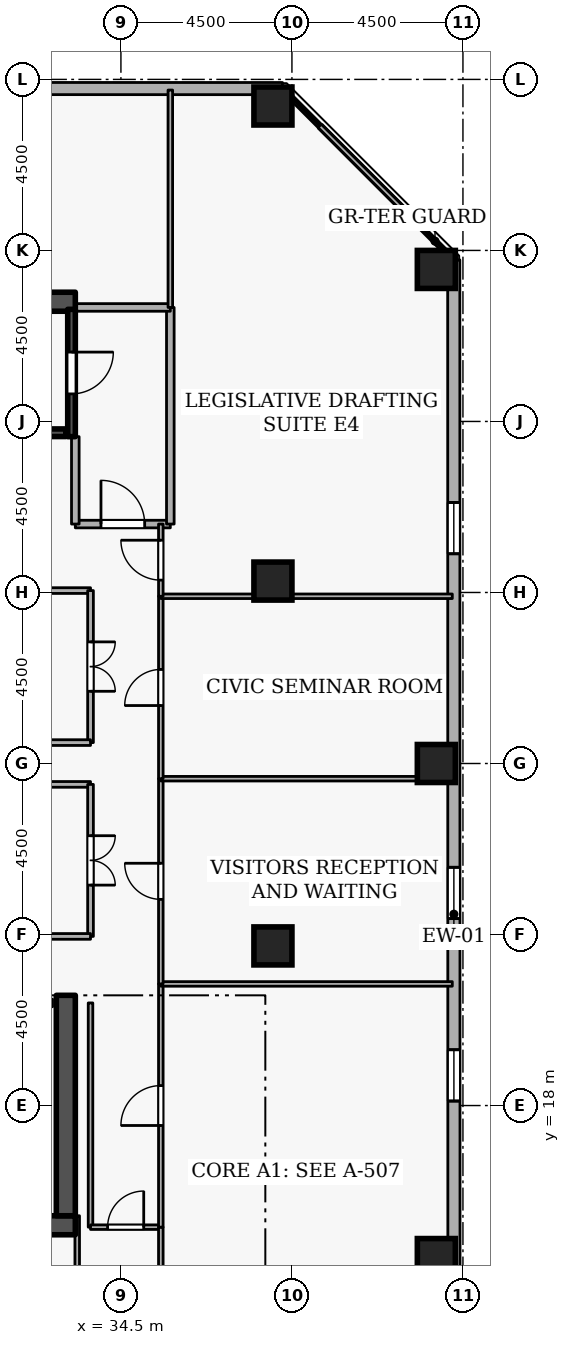
"""IFC4 building model, lengths in metres.
Left out: names, types, materials, properties, quantities, classifications, styles, units other than length and angle.
Written with IfcOpenShell. Run it as: python <this file> out.ifc"""

import sys

from ifc_helpers import new_model, si_unit, direction, frame, frame_2d, origin, origin_2d, place, context, subcontext, project, spatial, rectangle, extrude, element, fill, save


model = new_model("IFC4")
c1 = context("Model", 3, precision=1e-05, world=origin(), true_north=direction((0.0, 1.0)))
c2 = subcontext(c1, "Body", "Model", "MODEL_VIEW")
j1 = project(units=[si_unit("LENGTHUNIT", "METRE"), si_unit("PLANEANGLEUNIT", "RADIAN")], contexts=[c1])
p1 = place(None, origin())
s1 = spatial("IfcSite", under=j1, at=p1, CompositionType="ELEMENT")
p2 = place(p1, origin())
s2 = spatial("IfcBuilding", under=s1, at=p2, CompositionType="ELEMENT")
p3 = place(p2, frame((0.0, 0.0, 251.1)))
s3 = spatial("IfcBuildingStorey", under=s2, at=p3, CompositionType="ELEMENT", Elevation=251.1)
p4 = place(p3, frame((17.7, 14.85, 0.0), z_axis=(0.0, 0.0, 1.0), x_axis=(1.0, 0.0, 0.0)))
e1 = element("IfcWall", 1, at=p4, inside=s3, PredefinedType="SHEAR", context=c2, shape_type="SweptSolid", body=[
    extrude(rectangle(XDim=15.6, YDim=0.5, at=frame_2d((7.8, 0.0))), origin(), (0.0, 0.0, 1.0), 3.6),
])
p5 = place(p3, frame((33.05, 15.1, 0.0), z_axis=(0.0, 0.0, 1.0), x_axis=(0.0, 1.0, 0.0)))
e2 = element("IfcWall", 2, at=p5, inside=s3, PredefinedType="SHEAR", context=c2, shape_type="SweptSolid", body=[
    extrude(rectangle(XDim=5.8, YDim=0.5, at=frame_2d((2.9, 0.0))), origin(), (0.0, 0.0, 1.0), 3.6),
])
p6 = place(p3, frame((17.7, 39.15, 0.0), z_axis=(0.0, 0.0, 1.0), x_axis=(1.0, 0.0, 0.0)))
e3 = element("IfcWall", 3, at=p6, inside=s3, PredefinedType="SHEAR", context=c2, shape_type="SweptSolid", body=[
    extrude(rectangle(XDim=15.6, YDim=0.5, at=frame_2d((7.8, 0.0))), origin(), (0.0, 0.0, 1.0), 3.6),
])
for number, where, z_axis, x_axis in (
    (4, (42.8, 14.0, 0.0), (0.0, 0.0, 1.0), (1.0, 0.0, 0.0)),
    (5, (42.8, 27.0, 0.0), (0.0, 0.0, 1.0), (1.0, 0.0, 0.0)),
    (6, (42.8, 40.0, 0.0), (0.0, 0.0, 1.0), (1.0, 0.0, 0.0)),
    (7, (38.5, 44.3, 0.0), (0.0, 0.0, 1.0), (1.0, 0.0, 0.0)),
    (8, (38.5, 22.2, 0.0), (0.0, 0.0, 1.0), (1.0, 0.0, 0.0)),
    (9, (38.5, 31.8, 0.0), (0.0, 0.0, 1.0), (1.0, 0.0, 0.0)),
):
    element("IfcColumn", number, at=place(p3, frame(where, z_axis=z_axis, x_axis=x_axis)), inside=s3, PredefinedType="COLUMN", context=c2, shape_type="SweptSolid", body=[
        extrude(rectangle(XDim=1.0, YDim=1.0, at=origin_2d()), origin(), (0.0, 0.0, 1.0), 3.6),
    ])
p7 = place(p3, frame((43.265, 5.819, 0.0), z_axis=(0.0, 0.0, 1.0), x_axis=(-0.000184351399, 0.999999983007, 0.0)))
e10 = element("IfcWall", 10, at=p7, inside=s3, PredefinedType="STANDARD", context=c2, shape_type="SweptSolid", body=[
    extrude(rectangle(XDim=34.432, YDim=0.32, at=frame_2d((17.216, 0.0))), origin(), (0.0, 0.0, 1.0), 2.22),
])
p8 = place(p7, frame((2.7, 0.0, 0.72)))
e11 = element("IfcOpeningElement", 11, at=p8, cuts=e10, PredefinedType="OPENING", context=c2, shape_type="SweptSolid", body=[
    extrude(rectangle(XDim=1.35, YDim=1.05, at=frame_2d((0.675, 0.525))), frame((0.0, 0.17, 0.0), z_axis=(0.0, -1.0, 0.0), x_axis=(1.0, 0.0, 0.0)), (0.0, 0.0, 1.0), 0.34),
])
p9 = place(p7, frame((12.3, 0.0, 0.72)))
e12 = element("IfcOpeningElement", 12, at=p9, cuts=e10, PredefinedType="OPENING", context=c2, shape_type="SweptSolid", body=[
    extrude(rectangle(XDim=1.35, YDim=1.05, at=frame_2d((0.675, 0.525))), frame((0.0, 0.17, 0.0), z_axis=(0.0, -1.0, 0.0), x_axis=(1.0, 0.0, 0.0)), (0.0, 0.0, 1.0), 0.34),
])
p10 = place(p7, frame((17.1, 0.0, 0.72)))
e13 = element("IfcOpeningElement", 13, at=p10, cuts=e10, PredefinedType="OPENING", context=c2, shape_type="SweptSolid", body=[
    extrude(rectangle(XDim=1.35, YDim=1.05, at=frame_2d((0.675, 0.525))), frame((0.0, 0.17, 0.0), z_axis=(0.0, -1.0, 0.0), x_axis=(1.0, 0.0, 0.0)), (0.0, 0.0, 1.0), 0.34),
])
p11 = place(p7, frame((26.7, 0.0, 0.72)))
e14 = element("IfcOpeningElement", 14, at=p11, cuts=e10, PredefinedType="OPENING", context=c2, shape_type="SweptSolid", body=[
    extrude(rectangle(XDim=1.35, YDim=1.05, at=frame_2d((0.675, 0.525))), frame((0.0, 0.17, 0.0), z_axis=(0.0, -1.0, 0.0), x_axis=(1.0, 0.0, 0.0)), (0.0, 0.0, 1.0), 0.34),
])
p12 = place(p3, frame((38.751, 44.758, 0.0), z_axis=(0.0, 0.0, 1.0), x_axis=(-0.999999983007, 0.000184351399, 0.0)))
e15 = element("IfcWall", 15, at=p12, inside=s3, PredefinedType="STANDARD", context=c2, shape_type="SweptSolid", body=[
    extrude(rectangle(XDim=34.432, YDim=0.32, at=frame_2d((17.216, 0.0))), origin(), (0.0, 0.0, 1.0), 2.22),
])
p13 = place(p12, frame((7.5, 0.0, 0.72)))
e16 = element("IfcOpeningElement", 16, at=p13, cuts=e15, PredefinedType="OPENING", context=c2, shape_type="SweptSolid", body=[
    extrude(rectangle(XDim=1.35, YDim=1.05, at=frame_2d((0.675, 0.525))), frame((0.0, 0.17, 0.0), z_axis=(0.0, -1.0, 0.0), x_axis=(1.0, 0.0, 0.0)), (0.0, 0.0, 1.0), 0.34),
])
p14 = place(p12, frame((17.1, 0.0, 0.72)))
e17 = element("IfcOpeningElement", 17, at=p14, cuts=e15, PredefinedType="OPENING", context=c2, shape_type="SweptSolid", body=[
    extrude(rectangle(XDim=1.35, YDim=1.05, at=frame_2d((0.675, 0.525))), frame((0.0, 0.17, 0.0), z_axis=(0.0, -1.0, 0.0), x_axis=(1.0, 0.0, 0.0)), (0.0, 0.0, 1.0), 0.34),
])
p15 = place(p3, frame((33.2, 38.95, 0.0), z_axis=(0.0, 0.0, 1.0), x_axis=(0.0, -1.0, 0.0)))
e18 = element("IfcWall", 18, at=p15, inside=s3, PredefinedType="SHEAR", context=c2, shape_type="SweptSolid", body=[
    extrude(rectangle(XDim=3.35, YDim=0.2, at=frame_2d((1.675, 0.0))), origin(), (0.0, 0.0, 1.0), 3.6),
])
p16 = place(p15, frame((1.125, 0.0, 0.0)))
e19 = element("IfcOpeningElement", 19, at=p16, cuts=e18, PredefinedType="OPENING", context=c2, shape_type="SweptSolid", body=[
    extrude(rectangle(XDim=1.1, YDim=2.1, at=frame_2d((0.55, 1.05))), frame((0.0, 0.11, 0.0), z_axis=(0.0, -1.0, 0.0), x_axis=(1.0, 0.0, 0.0)), (0.0, 0.0, 1.0), 0.22),
])
p17 = place(p3, frame((25.95, 35.703, 0.0), z_axis=(0.0, 0.0, 1.0), x_axis=(1.0, 0.0, 0.0)))
e20 = element("IfcWall", 20, at=p17, inside=s3, PredefinedType="SHEAR", context=c2, shape_type="SweptSolid", body=[
    extrude(rectangle(XDim=7.1, YDim=0.2, at=frame_2d((3.55, 0.0))), origin(), (0.0, 0.0, 1.0), 3.6),
])
p18 = place(p3, frame((33.3, 33.3, 0.0), z_axis=(0.0, 0.0, 1.0), x_axis=(1.0, 0.0, 0.0)))
e21 = element("IfcWall", 21, at=p18, inside=s3, PredefinedType="STANDARD", context=c2, shape_type="SweptSolid", body=[
    extrude(rectangle(XDim=2.5, YDim=0.2, at=frame_2d((1.25, 0.0))), origin(), (0.0, 0.0, 1.0), 3.32),
])
p19 = place(p18, frame((0.675, 0.0, 0.0)))
e22 = element("IfcOpeningElement", 22, at=p19, cuts=e21, PredefinedType="OPENING", context=c2, shape_type="SweptSolid", body=[
    extrude(rectangle(XDim=1.15, YDim=2.1, at=frame_2d((0.575, 1.05))), frame((0.0, 0.11, 0.0), z_axis=(0.0, -1.0, 0.0), x_axis=(1.0, 0.0, 0.0)), (0.0, 0.0, 1.0), 0.22),
])
p20 = place(p3, frame((35.8, 33.3, 0.0), z_axis=(0.0, 0.0, 1.0), x_axis=(0.0, 1.0, 0.0)))
e23 = element("IfcWall", 23, at=p20, inside=s3, PredefinedType="STANDARD", context=c2, shape_type="SweptSolid", body=[
    extrude(rectangle(XDim=5.7, YDim=0.2, at=frame_2d((2.85, 0.0))), origin(), (0.0, 0.0, 1.0), 3.32),
])
p21 = place(p3, frame((35.8, 39.0, 0.0), z_axis=(0.0, 0.0, 1.0), x_axis=(-1.0, 0.0, 0.0)))
e24 = element("IfcWall", 24, at=p21, inside=s3, PredefinedType="STANDARD", context=c2, shape_type="SweptSolid", body=[
    extrude(rectangle(XDim=2.5, YDim=0.2, at=frame_2d((1.25, 0.0))), origin(), (0.0, 0.0, 1.0), 3.32),
])
p22 = place(p3, frame((33.3, 35.6, 0.0), z_axis=(0.0, 0.0, 1.0), x_axis=(0.0, -1.0, 0.0)))
e25 = element("IfcWall", 25, at=p22, inside=s3, PredefinedType="STANDARD", context=c2, shape_type="SweptSolid", body=[
    extrude(rectangle(XDim=2.3, YDim=0.2, at=frame_2d((1.15, 0.0))), origin(), (0.0, 0.0, 1.0), 2.525),
])
p23 = place(p3, frame((33.7, 20.7, 0.0), z_axis=(0.0, 0.0, 1.0), x_axis=(0.0, -1.0, 0.0)))
e26 = element("IfcWall", 26, at=p23, inside=s3, PredefinedType="PARTITIONING", context=c2, shape_type="SweptSolid", body=[
    extrude(rectangle(XDim=5.9, YDim=0.12, at=frame_2d((2.95, 0.0))), origin(), (0.0, 0.0, 1.0), 3.32),
])
p24 = place(p3, frame((33.7, 14.8, 0.0), z_axis=(0.0, 0.0, 1.0), x_axis=(1.0, 0.0, 0.0)))
e27 = element("IfcWall", 27, at=p24, inside=s3, PredefinedType="PARTITIONING", context=c2, shape_type="SweptSolid", body=[
    extrude(rectangle(XDim=1.85, YDim=0.12, at=frame_2d((0.925, 0.0))), origin(), (0.0, 0.0, 1.0), 3.32),
])
p25 = place(p24, frame((0.45, 0.0, 0.0)))
e28 = element("IfcOpeningElement", 28, at=p25, cuts=e27, PredefinedType="OPENING", context=c2, shape_type="SweptSolid", body=[
    extrude(rectangle(XDim=0.95, YDim=2.1, at=frame_2d((0.475, 1.05))), frame((0.0, 0.07, 0.0), z_axis=(0.0, -1.0, 0.0), x_axis=(1.0, 0.0, 0.0)), (0.0, 0.0, 1.0), 0.14),
])
p26 = place(p3, frame((35.55, 14.8, 0.0), z_axis=(0.0, 0.0, 1.0), x_axis=(0.0, -1.0, 0.0)))
e29 = element("IfcWall", 29, at=p26, inside=s3, PredefinedType="PARTITIONING", context=c2, shape_type="SweptSolid", body=[
    extrude(rectangle(XDim=11.52, YDim=0.12, at=frame_2d((5.76, 0.0))), origin(), (0.0, 0.0, 1.0), 3.32),
])
p27 = place(p3, frame((33.35, 3.28, 0.0), z_axis=(0.0, 0.0, 1.0), x_axis=(0.0, 1.0, 0.0)))
e30 = element("IfcWall", 30, at=p27, inside=s3, PredefinedType="PARTITIONING", context=c2, shape_type="SweptSolid", body=[
    extrude(rectangle(XDim=11.82, YDim=0.12, at=frame_2d((5.91, 0.0))), origin(), (0.0, 0.0, 1.0), 2.525),
])
p28 = place(p3, frame((35.55, 14.8, 0.0), z_axis=(0.0, 0.0, 1.0), x_axis=(0.0, 1.0, 0.0)))
e31 = element("IfcWall", 31, at=p28, inside=s3, PredefinedType="PARTITIONING", context=c2, shape_type="SweptSolid", body=[
    extrude(rectangle(XDim=6.4, YDim=0.12, at=frame_2d((3.2, 0.0))), origin(), (0.0, 0.0, 1.0), 3.32),
])
p29 = place(p28, frame((2.675, 0.0, 0.0)))
e32 = element("IfcOpeningElement", 32, at=p29, cuts=e31, PredefinedType="OPENING", context=c2, shape_type="SweptSolid", body=[
    extrude(rectangle(XDim=1.05, YDim=2.1, at=frame_2d((0.525, 1.05))), frame((0.0, 0.07, 0.0), z_axis=(0.0, -1.0, 0.0), x_axis=(1.0, 0.0, 0.0)), (0.0, 0.0, 1.0), 0.14),
])
p30 = place(p3, frame((35.55, 21.2, 0.0), z_axis=(0.0, 0.0, 1.0), x_axis=(1.0, 0.0, 0.0)))
e33 = element("IfcWall", 33, at=p30, inside=s3, PredefinedType="PARTITIONING", context=c2, shape_type="SweptSolid", body=[
    extrude(rectangle(XDim=7.67, YDim=0.12, at=frame_2d((3.835, 0.0))), origin(), (0.0, 0.0, 1.0), 3.32),
])
p31 = place(p3, frame((35.55, 21.2, 0.0), z_axis=(0.0, 0.0, 1.0), x_axis=(0.0, 1.0, 0.0)))
e34 = element("IfcWall", 34, at=p31, inside=s3, PredefinedType="PARTITIONING", context=c2, shape_type="SweptSolid", body=[
    extrude(rectangle(XDim=5.4, YDim=0.12, at=frame_2d((2.7, 0.0))), origin(), (0.0, 0.0, 1.0), 3.32),
])
p32 = place(p31, frame((2.225, 0.0, 0.0)))
e35 = element("IfcOpeningElement", 35, at=p32, cuts=e34, PredefinedType="OPENING", context=c2, shape_type="SweptSolid", body=[
    extrude(rectangle(XDim=0.95, YDim=2.1, at=frame_2d((0.475, 1.05))), frame((0.0, 0.07, 0.0), z_axis=(0.0, -1.0, 0.0), x_axis=(1.0, 0.0, 0.0)), (0.0, 0.0, 1.0), 0.14),
])
p33 = place(p3, frame((35.55, 26.6, 0.0), z_axis=(0.0, 0.0, 1.0), x_axis=(1.0, 0.0, 0.0)))
e36 = element("IfcWall", 36, at=p33, inside=s3, PredefinedType="PARTITIONING", context=c2, shape_type="SweptSolid", body=[
    extrude(rectangle(XDim=7.67, YDim=0.12, at=frame_2d((3.835, 0.0))), origin(), (0.0, 0.0, 1.0), 1.785),
])
p34 = place(p3, frame((35.55, 26.6, 0.0), z_axis=(0.0, 0.0, 1.0), x_axis=(0.0, 1.0, 0.0)))
e37 = element("IfcWall", 37, at=p34, inside=s3, PredefinedType="PARTITIONING", context=c2, shape_type="SweptSolid", body=[
    extrude(rectangle(XDim=4.8, YDim=0.12, at=frame_2d((2.4, 0.0))), origin(), (0.0, 0.0, 1.0), 3.32),
])
p35 = place(p34, frame((1.925, 0.0, 0.0)))
e38 = element("IfcOpeningElement", 38, at=p35, cuts=e37, PredefinedType="OPENING", context=c2, shape_type="SweptSolid", body=[
    extrude(rectangle(XDim=0.95, YDim=2.1, at=frame_2d((0.475, 1.05))), frame((0.0, 0.07, 0.0), z_axis=(0.0, -1.0, 0.0), x_axis=(1.0, 0.0, 0.0)), (0.0, 0.0, 1.0), 0.14),
])
p36 = place(p3, frame((35.55, 31.4, 0.0), z_axis=(0.0, 0.0, 1.0), x_axis=(1.0, 0.0, 0.0)))
e39 = element("IfcWall", 39, at=p36, inside=s3, PredefinedType="PARTITIONING", context=c2, shape_type="SweptSolid", body=[
    extrude(rectangle(XDim=7.67, YDim=0.12, at=frame_2d((3.835, 0.0))), origin(), (0.0, 0.0, 1.0), 3.32),
])
p37 = place(p3, frame((35.8, 39.0, 0.0), z_axis=(0.0, 0.0, 1.0), x_axis=(0.0, 1.0, 0.0)))
e40 = element("IfcWall", 40, at=p37, inside=s3, PredefinedType="PARTITIONING", context=c2, shape_type="SweptSolid", body=[
    extrude(rectangle(XDim=5.72, YDim=0.12, at=frame_2d((2.86, 0.0))), origin(), (0.0, 0.0, 1.0), 3.32),
])
p38 = place(p3, frame((38.787, 44.72, 0.0), z_axis=(0.0, 0.0, 1.0), x_axis=(0.707106781187, -0.707106781187, 0.0)))
e41 = element("IfcWall", 41, at=p38, inside=s3, PredefinedType="PARTITIONING", context=c2, shape_type="SweptSolid", body=[
    extrude(rectangle(XDim=6.269, YDim=0.12, at=frame_2d((3.134, 0.0))), origin(), (0.0, 0.0, 1.0), 3.32),
])
p39 = place(p3, frame((35.55, 31.4, 0.0), z_axis=(0.0, 0.0, 1.0), x_axis=(0.0, 1.0, 0.0)))
e42 = element("IfcWall", 42, at=p39, inside=s3, PredefinedType="PARTITIONING", context=c2, shape_type="SweptSolid", body=[
    extrude(rectangle(XDim=1.9, YDim=0.12, at=frame_2d((0.95, 0.0))), origin(), (0.0, 0.0, 1.0), 3.32),
])
p40 = place(p39, frame((0.425, 0.0, 0.0)))
e43 = element("IfcOpeningElement", 43, at=p40, cuts=e42, PredefinedType="OPENING", context=c2, shape_type="SweptSolid", body=[
    extrude(rectangle(XDim=1.05, YDim=2.1, at=frame_2d((0.525, 1.05))), frame((0.0, 0.07, 0.0), z_axis=(0.0, -1.0, 0.0), x_axis=(1.0, 0.0, 0.0)), (0.0, 0.0, 1.0), 0.14),
])
p41 = place(p3, frame((30.7, 26.45, 0.0), z_axis=(0.0, 0.0, 1.0), x_axis=(1.0, 0.0, 0.0)))
e44 = element("IfcWall", 44, at=p41, inside=s3, PredefinedType="PARTITIONING", context=c2, shape_type="SweptSolid", body=[
    extrude(rectangle(XDim=3.0, YDim=0.15, at=frame_2d((1.5, 0.0))), origin(), (0.0, 0.0, 1.0), 1.785),
])
p42 = place(p3, frame((33.7, 26.45, 0.0), z_axis=(0.0, 0.0, 1.0), x_axis=(0.0, -1.0, 0.0)))
e45 = element("IfcWall", 45, at=p42, inside=s3, PredefinedType="PARTITIONING", context=c2, shape_type="SweptSolid", body=[
    extrude(rectangle(XDim=4.0, YDim=0.15, at=frame_2d((2.0, 0.0))), origin(), (0.0, 0.0, 1.0), 3.32),
])
p43 = place(p42, frame((1.35, 0.0, 0.0)))
e46 = element("IfcOpeningElement", 46, at=p43, cuts=e45, PredefinedType="OPENING", context=c2, shape_type="SweptSolid", body=[
    extrude(rectangle(XDim=1.3, YDim=2.12, at=frame_2d((0.65, 1.06))), frame((0.0, 0.085, 0.0), z_axis=(0.0, -1.0, 0.0), x_axis=(1.0, 0.0, 0.0)), (0.0, 0.0, 1.0), 0.17),
])
for number, where, z_axis, x_axis in (
    (47, (33.7, 22.45, 0.0), (0.0, 0.0, 1.0), (-1.0, 0.0, 0.0)),
    (48, (30.7, 31.55, 0.0), (0.0, 0.0, 1.0), (1.0, 0.0, 0.0)),
):
    element("IfcWall", number, at=place(p3, frame(where, z_axis=z_axis, x_axis=x_axis)), inside=s3, PredefinedType="PARTITIONING", context=c2, shape_type="SweptSolid", body=[
        extrude(rectangle(XDim=3.0, YDim=0.15, at=frame_2d((1.5, 0.0))), origin(), (0.0, 0.0, 1.0), 3.32),
    ])
p44 = place(p3, frame((33.7, 31.55, 0.0), z_axis=(0.0, 0.0, 1.0), x_axis=(0.0, -1.0, 0.0)))
e49 = element("IfcWall", 49, at=p44, inside=s3, PredefinedType="PARTITIONING", context=c2, shape_type="SweptSolid", body=[
    extrude(rectangle(XDim=4.0, YDim=0.15, at=frame_2d((2.0, 0.0))), origin(), (0.0, 0.0, 1.0), 3.32),
])
p45 = place(p44, frame((1.35, 0.0, 0.0)))
e50 = element("IfcOpeningElement", 50, at=p45, cuts=e49, PredefinedType="OPENING", context=c2, shape_type="SweptSolid", body=[
    extrude(rectangle(XDim=1.3, YDim=2.12, at=frame_2d((0.65, 1.06))), frame((0.0, 0.085, 0.0), z_axis=(0.0, -1.0, 0.0), x_axis=(1.0, 0.0, 0.0)), (0.0, 0.0, 1.0), 0.17),
])
p46 = place(p3, frame((33.7, 27.55, 0.0), z_axis=(0.0, 0.0, 1.0), x_axis=(-1.0, 0.0, 0.0)))
e51 = element("IfcWall", 51, at=p46, inside=s3, PredefinedType="PARTITIONING", context=c2, shape_type="SweptSolid", body=[
    extrude(rectangle(XDim=3.0, YDim=0.15, at=frame_2d((1.5, 0.0))), origin(), (0.0, 0.0, 1.0), 1.785),
])
p47 = place(p9, origin())
e52 = element("IfcWindow", 52, at=p47, inside=s3, PartitioningType="SINGLE_PANEL", PredefinedType="WINDOW", context=c2, shape_type="SweptSolid", body=[
    extrude(rectangle(XDim=1.35, YDim=1.05, at=frame_2d((0.675, 0.525))), frame((0.0, 0.03, 0.0), z_axis=(0.0, -1.0, 0.0), x_axis=(1.0, 0.0, 0.0)), (0.0, 0.0, 1.0), 0.06),
])
fill(e12, e52)
p48 = place(p10, origin())
e53 = element("IfcWindow", 53, at=p48, inside=s3, PartitioningType="SINGLE_PANEL", PredefinedType="WINDOW", context=c2, shape_type="SweptSolid", body=[
    extrude(rectangle(XDim=1.35, YDim=1.05, at=frame_2d((0.675, 0.525))), frame((0.0, 0.03, 0.0), z_axis=(0.0, -1.0, 0.0), x_axis=(1.0, 0.0, 0.0)), (0.0, 0.0, 1.0), 0.06),
])
fill(e13, e53)
p49 = place(p11, origin())
e54 = element("IfcWindow", 54, at=p49, inside=s3, PartitioningType="SINGLE_PANEL", PredefinedType="WINDOW", context=c2, shape_type="SweptSolid", body=[
    extrude(rectangle(XDim=1.35, YDim=1.05, at=frame_2d((0.675, 0.525))), frame((0.0, 0.03, 0.0), z_axis=(0.0, -1.0, 0.0), x_axis=(1.0, 0.0, 0.0)), (0.0, 0.0, 1.0), 0.06),
])
fill(e14, e54)
p50 = place(p16, origin())
e55 = element("IfcDoor", 55, at=p50, inside=s3, OperationType="SINGLE_SWING_LEFT", PredefinedType="DOOR", context=c2, shape_type="SweptSolid", body=[
    extrude(rectangle(XDim=1.1, YDim=2.1, at=frame_2d((0.55, 1.05))), frame((0.0, 0.025, 0.0), z_axis=(0.0, -1.0, 0.0), x_axis=(1.0, 0.0, 0.0)), (0.0, 0.0, 1.0), 0.05),
])
fill(e19, e55)
p51 = place(p19, origin())
e56 = element("IfcDoor", 56, at=p51, inside=s3, OperationType="SINGLE_SWING_LEFT", PredefinedType="DOOR", context=c2, shape_type="SweptSolid", body=[
    extrude(rectangle(XDim=1.15, YDim=2.1, at=frame_2d((0.575, 1.05))), frame((0.0, 0.025, 0.0), z_axis=(0.0, -1.0, 0.0), x_axis=(1.0, 0.0, 0.0)), (0.0, 0.0, 1.0), 0.05),
])
fill(e22, e56)
p52 = place(p25, origin())
e57 = element("IfcDoor", 57, at=p52, inside=s3, OperationType="SINGLE_SWING_RIGHT", PredefinedType="DOOR", context=c2, shape_type="SweptSolid", body=[
    extrude(rectangle(XDim=0.95, YDim=2.1, at=frame_2d((0.475, 1.05))), frame((0.0, 0.025, 0.0), z_axis=(0.0, -1.0, 0.0), x_axis=(1.0, 0.0, 0.0)), (0.0, 0.0, 1.0), 0.05),
])
fill(e28, e57)
p53 = place(p29, origin())
e58 = element("IfcDoor", 58, at=p53, inside=s3, OperationType="SINGLE_SWING_LEFT", PredefinedType="DOOR", context=c2, shape_type="SweptSolid", body=[
    extrude(rectangle(XDim=1.05, YDim=2.1, at=frame_2d((0.525, 1.05))), frame((0.0, 0.025, 0.0), z_axis=(0.0, -1.0, 0.0), x_axis=(1.0, 0.0, 0.0)), (0.0, 0.0, 1.0), 0.05),
])
fill(e32, e58)
p54 = place(p32, origin())
e59 = element("IfcDoor", 59, at=p54, inside=s3, OperationType="SINGLE_SWING_RIGHT", PredefinedType="DOOR", context=c2, shape_type="SweptSolid", body=[
    extrude(rectangle(XDim=0.95, YDim=2.1, at=frame_2d((0.475, 1.05))), frame((0.0, 0.025, 0.0), z_axis=(0.0, -1.0, 0.0), x_axis=(1.0, 0.0, 0.0)), (0.0, 0.0, 1.0), 0.05),
])
fill(e35, e59)
p55 = place(p35, origin())
e60 = element("IfcDoor", 60, at=p55, inside=s3, OperationType="SINGLE_SWING_LEFT", PredefinedType="DOOR", context=c2, shape_type="SweptSolid", body=[
    extrude(rectangle(XDim=0.95, YDim=2.1, at=frame_2d((0.475, 1.05))), frame((0.0, 0.025, 0.0), z_axis=(0.0, -1.0, 0.0), x_axis=(1.0, 0.0, 0.0)), (0.0, 0.0, 1.0), 0.05),
])
fill(e38, e60)
p56 = place(p40, origin())
e61 = element("IfcDoor", 61, at=p56, inside=s3, OperationType="SINGLE_SWING_RIGHT", PredefinedType="DOOR", context=c2, shape_type="SweptSolid", body=[
    extrude(rectangle(XDim=1.05, YDim=2.1, at=frame_2d((0.525, 1.05))), frame((0.0, 0.025, 0.0), z_axis=(0.0, -1.0, 0.0), x_axis=(1.0, 0.0, 0.0)), (0.0, 0.0, 1.0), 0.05),
])
fill(e43, e61)
p57 = place(p43, origin())
e62 = element("IfcDoor", 62, at=p57, inside=s3, OperationType="DOUBLE_DOOR_SINGLE_SWING", PredefinedType="DOOR", context=c2, shape_type="SweptSolid", body=[
    extrude(rectangle(XDim=1.3, YDim=2.12, at=frame_2d((0.65, 1.06))), frame((0.0, 0.025, 0.0), z_axis=(0.0, -1.0, 0.0), x_axis=(1.0, 0.0, 0.0)), (0.0, 0.0, 1.0), 0.05),
])
fill(e46, e62)
p58 = place(p45, origin())
e63 = element("IfcDoor", 63, at=p58, inside=s3, OperationType="DOUBLE_DOOR_SINGLE_SWING", PredefinedType="DOOR", context=c2, shape_type="SweptSolid", body=[
    extrude(rectangle(XDim=1.3, YDim=2.12, at=frame_2d((0.65, 1.06))), frame((0.0, 0.025, 0.0), z_axis=(0.0, -1.0, 0.0), x_axis=(1.0, 0.0, 0.0)), (0.0, 0.0, 1.0), 0.05),
])
fill(e50, e63)
save(model, sys.argv[1])
